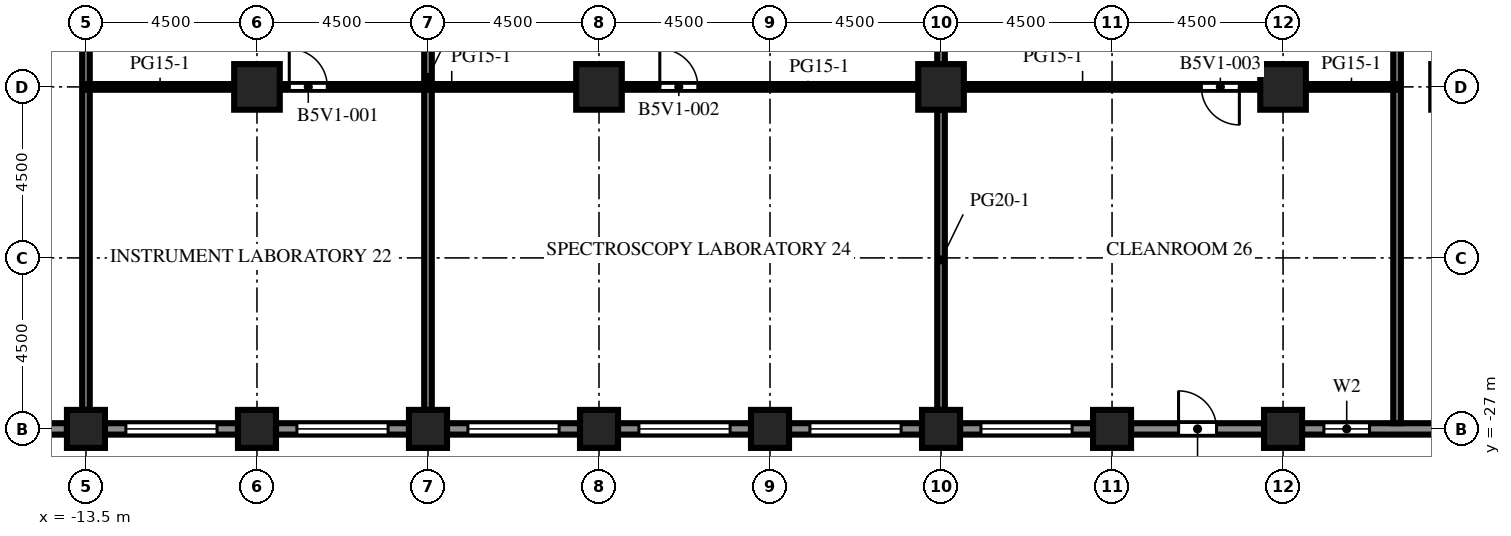
"""IFC4 building model, lengths in metres.
Left out: names, types, materials, properties, quantities, classifications, styles, units other than length and angle.
Written with IfcOpenShell. Run it as: python <this file> out.ifc"""

import sys

from ifc_helpers import new_model, si_unit, direction, frame, frame_2d, origin, origin_2d, place, context, subcontext, project, spatial, rectangle, extrude, element, fill, save


model = new_model("IFC4")
c1 = context("Model", 3, precision=1e-05, world=origin(), true_north=direction((0.0, 1.0)))
c2 = subcontext(c1, "Body", "Model", "MODEL_VIEW")
j1 = project(units=[si_unit("LENGTHUNIT", "METRE"), si_unit("PLANEANGLEUNIT", "RADIAN")], contexts=[c1])
p1 = place(None, origin())
s1 = spatial("IfcSite", under=j1, at=p1, CompositionType="ELEMENT")
p2 = place(p1, origin())
s2 = spatial("IfcBuilding", under=s1, at=p2, CompositionType="ELEMENT")
p3 = place(p2, frame((0.0, 0.0, 165.0)))
s3 = spatial("IfcBuildingStorey", under=s2, at=p3, CompositionType="ELEMENT", Elevation=165.0)
for number, where, z_axis, x_axis in (
    (1, (-13.5, -27.0, 0.0), (0.0, 0.0, 1.0), (1.0, 0.0, 0.0)),
    (2, (-9.0, -27.0, 0.0), (0.0, 0.0, 1.0), (1.0, 0.0, 0.0)),
    (3, (-4.5, -27.0, 0.0), (0.0, 0.0, 1.0), (1.0, 0.0, 0.0)),
    (4, (0.0, -27.0, 0.0), (0.0, 0.0, 1.0), (1.0, 0.0, 0.0)),
    (5, (4.5, -27.0, 0.0), (0.0, 0.0, 1.0), (1.0, 0.0, 0.0)),
    (6, (9.0, -27.0, 0.0), (0.0, 0.0, 1.0), (1.0, 0.0, 0.0)),
    (7, (13.5, -27.0, 0.0), (0.0, 0.0, 1.0), (1.0, 0.0, 0.0)),
    (8, (18.0, -27.0, 0.0), (0.0, 0.0, 1.0), (1.0, 0.0, 0.0)),
):
    element("IfcColumn", number, at=place(p3, frame(where, z_axis=z_axis, x_axis=x_axis)), inside=s3, PredefinedType="COLUMN", context=c2, shape_type="SweptSolid", body=[
        extrude(rectangle(XDim=1.0, YDim=1.0, at=origin_2d()), origin(), (0.0, 0.0, 1.0), 4.1),
    ])
for number, where, z_axis, x_axis in (
    (9, (-9.0, -18.0, 0.0), (0.0, 0.0, 1.0), (1.0, 0.0, 0.0)),
    (10, (0.0, -18.0, 0.0), (0.0, 0.0, 1.0), (1.0, 0.0, 0.0)),
    (11, (9.0, -18.0, 0.0), (0.0, 0.0, 1.0), (1.0, 0.0, 0.0)),
    (12, (18.0, -18.0, 0.0), (0.0, 0.0, 1.0), (1.0, 0.0, 0.0)),
):
    element("IfcColumn", number, at=place(p3, frame(where, z_axis=z_axis, x_axis=x_axis)), inside=s3, PredefinedType="COLUMN", context=c2, shape_type="SweptSolid", body=[
        extrude(rectangle(XDim=1.2, YDim=1.2, at=origin_2d()), origin(), (0.0, 0.0, 1.0), 4.1),
    ])
p4 = place(p3, frame((-14.0, -27.0, 0.0), z_axis=(0.0, 0.0, 1.0), x_axis=(-1.0, 0.0, 0.0)))
e13 = element("IfcWall", 13, at=p4, inside=s3, PredefinedType="SOLIDWALL", context=c2, shape_type="SweptSolid", body=[
    extrude(rectangle(XDim=3.5, YDim=0.3, at=frame_2d((1.75, 0.0))), origin(), (0.0, 0.0, 1.0), 2.85),
])
p5 = place(p4, frame((1.25, 0.0, 0.0)))
e14 = element("IfcOpeningElement", 14, at=p5, cuts=e13, PredefinedType="OPENING", context=c2, shape_type="SweptSolid", body=[
    extrude(rectangle(XDim=1.0, YDim=2.2, at=frame_2d((0.5, 1.1))), frame((0.0, 0.16, 0.0), z_axis=(0.0, -1.0, 0.0), x_axis=(1.0, 0.0, 0.0)), (0.0, 0.0, 1.0), 0.32),
])
p6 = place(p3, frame((-9.5, -27.0, 0.0), z_axis=(0.0, 0.0, 1.0), x_axis=(-1.0, 0.0, 0.0)))
e15 = element("IfcWall", 15, at=p6, inside=s3, PredefinedType="SOLIDWALL", context=c2, shape_type="SweptSolid", body=[
    extrude(rectangle(XDim=3.5, YDim=0.3, at=frame_2d((1.75, 0.0))), origin(), (0.0, 0.0, 1.0), 2.85),
])
p7 = place(p6, frame((0.55, 0.0, 0.8)))
e16 = element("IfcOpeningElement", 16, at=p7, cuts=e15, PredefinedType="OPENING", context=c2, shape_type="SweptSolid", body=[
    extrude(rectangle(XDim=2.4, YDim=1.7, at=frame_2d((1.2, 0.85))), frame((0.0, 0.16, 0.0), z_axis=(0.0, -1.0, 0.0), x_axis=(1.0, 0.0, 0.0)), (0.0, 0.0, 1.0), 0.32),
])
p8 = place(p3, frame((-5.0, -27.0, 0.0), z_axis=(0.0, 0.0, 1.0), x_axis=(-1.0, 0.0, 0.0)))
e17 = element("IfcWall", 17, at=p8, inside=s3, PredefinedType="SOLIDWALL", context=c2, shape_type="SweptSolid", body=[
    extrude(rectangle(XDim=3.5, YDim=0.3, at=frame_2d((1.75, 0.0))), origin(), (0.0, 0.0, 1.0), 2.85),
])
p9 = place(p8, frame((0.55, 0.0, 0.8)))
e18 = element("IfcOpeningElement", 18, at=p9, cuts=e17, PredefinedType="OPENING", context=c2, shape_type="SweptSolid", body=[
    extrude(rectangle(XDim=2.4, YDim=1.7, at=frame_2d((1.2, 0.85))), frame((0.0, 0.16, 0.0), z_axis=(0.0, -1.0, 0.0), x_axis=(1.0, 0.0, 0.0)), (0.0, 0.0, 1.0), 0.32),
])
p10 = place(p3, frame((-0.5, -27.0, 0.0), z_axis=(0.0, 0.0, 1.0), x_axis=(-1.0, 0.0, 0.0)))
e19 = element("IfcWall", 19, at=p10, inside=s3, PredefinedType="SOLIDWALL", context=c2, shape_type="SweptSolid", body=[
    extrude(rectangle(XDim=3.5, YDim=0.3, at=frame_2d((1.75, 0.0))), origin(), (0.0, 0.0, 1.0), 2.85),
])
p11 = place(p10, frame((0.55, 0.0, 0.8)))
e20 = element("IfcOpeningElement", 20, at=p11, cuts=e19, PredefinedType="OPENING", context=c2, shape_type="SweptSolid", body=[
    extrude(rectangle(XDim=2.4, YDim=1.7, at=frame_2d((1.2, 0.85))), frame((0.0, 0.16, 0.0), z_axis=(0.0, -1.0, 0.0), x_axis=(1.0, 0.0, 0.0)), (0.0, 0.0, 1.0), 0.32),
])
p12 = place(p3, frame((4.0, -27.0, 0.0), z_axis=(0.0, 0.0, 1.0), x_axis=(-1.0, 0.0, 0.0)))
e21 = element("IfcWall", 21, at=p12, inside=s3, PredefinedType="SOLIDWALL", context=c2, shape_type="SweptSolid", body=[
    extrude(rectangle(XDim=3.5, YDim=0.3, at=frame_2d((1.75, 0.0))), origin(), (0.0, 0.0, 1.0), 2.85),
])
p13 = place(p12, frame((0.55, 0.0, 0.8)))
e22 = element("IfcOpeningElement", 22, at=p13, cuts=e21, PredefinedType="OPENING", context=c2, shape_type="SweptSolid", body=[
    extrude(rectangle(XDim=2.4, YDim=1.7, at=frame_2d((1.2, 0.85))), frame((0.0, 0.16, 0.0), z_axis=(0.0, -1.0, 0.0), x_axis=(1.0, 0.0, 0.0)), (0.0, 0.0, 1.0), 0.32),
])
p14 = place(p3, frame((8.5, -27.0, 0.0), z_axis=(0.0, 0.0, 1.0), x_axis=(-1.0, 0.0, 0.0)))
e23 = element("IfcWall", 23, at=p14, inside=s3, PredefinedType="SOLIDWALL", context=c2, shape_type="SweptSolid", body=[
    extrude(rectangle(XDim=3.5, YDim=0.3, at=frame_2d((1.75, 0.0))), origin(), (0.0, 0.0, 1.0), 2.85),
])
p15 = place(p14, frame((0.55, 0.0, 0.8)))
e24 = element("IfcOpeningElement", 24, at=p15, cuts=e23, PredefinedType="OPENING", context=c2, shape_type="SweptSolid", body=[
    extrude(rectangle(XDim=2.4, YDim=1.7, at=frame_2d((1.2, 0.85))), frame((0.0, 0.16, 0.0), z_axis=(0.0, -1.0, 0.0), x_axis=(1.0, 0.0, 0.0)), (0.0, 0.0, 1.0), 0.32),
])
p16 = place(p3, frame((13.0, -27.0, 0.0), z_axis=(0.0, 0.0, 1.0), x_axis=(-1.0, 0.0, 0.0)))
e25 = element("IfcWall", 25, at=p16, inside=s3, PredefinedType="SOLIDWALL", context=c2, shape_type="SweptSolid", body=[
    extrude(rectangle(XDim=3.5, YDim=0.3, at=frame_2d((1.75, 0.0))), origin(), (0.0, 0.0, 1.0), 2.85),
])
p17 = place(p16, frame((0.55, 0.0, 0.8)))
e26 = element("IfcOpeningElement", 26, at=p17, cuts=e25, PredefinedType="OPENING", context=c2, shape_type="SweptSolid", body=[
    extrude(rectangle(XDim=2.4, YDim=1.7, at=frame_2d((1.2, 0.85))), frame((0.0, 0.16, 0.0), z_axis=(0.0, -1.0, 0.0), x_axis=(1.0, 0.0, 0.0)), (0.0, 0.0, 1.0), 0.32),
])
p18 = place(p3, frame((17.5, -27.0, 0.0), z_axis=(0.0, 0.0, 1.0), x_axis=(-1.0, 0.0, 0.0)))
e27 = element("IfcWall", 27, at=p18, inside=s3, PredefinedType="SOLIDWALL", context=c2, shape_type="SweptSolid", body=[
    extrude(rectangle(XDim=3.5, YDim=0.3, at=frame_2d((1.75, 0.0))), origin(), (0.0, 0.0, 1.0), 2.85),
])
p19 = place(p18, frame((1.25, 0.0, 0.0)))
e28 = element("IfcOpeningElement", 28, at=p19, cuts=e27, PredefinedType="OPENING", context=c2, shape_type="SweptSolid", body=[
    extrude(rectangle(XDim=1.0, YDim=2.2, at=frame_2d((0.5, 1.1))), frame((0.0, 0.16, 0.0), z_axis=(0.0, -1.0, 0.0), x_axis=(1.0, 0.0, 0.0)), (0.0, 0.0, 1.0), 0.32),
])
p20 = place(p3, frame((22.0, -27.0, 0.0), z_axis=(0.0, 0.0, 1.0), x_axis=(-1.0, 0.0, 0.0)))
e29 = element("IfcWall", 29, at=p20, inside=s3, PredefinedType="SOLIDWALL", context=c2, shape_type="SweptSolid", body=[
    extrude(rectangle(XDim=3.5, YDim=0.3, at=frame_2d((1.75, 0.0))), origin(), (0.0, 0.0, 1.0), 2.85),
])
p21 = place(p20, frame((1.725, 0.0, 0.8)))
e30 = element("IfcOpeningElement", 30, at=p21, cuts=e29, PredefinedType="OPENING", context=c2, shape_type="SweptSolid", body=[
    extrude(rectangle(XDim=1.2, YDim=1.7, at=frame_2d((0.6, 0.85))), frame((0.0, 0.16, 0.0), z_axis=(0.0, -1.0, 0.0), x_axis=(1.0, 0.0, 0.0)), (0.0, 0.0, 1.0), 0.32),
])
p22 = place(p3, frame((-13.5, -26.5, 0.0), z_axis=(0.0, 0.0, 1.0), x_axis=(0.0, 1.0, 0.0)))
e31 = element("IfcWall", 31, at=p22, inside=s3, PredefinedType="PARTITIONING", context=c2, shape_type="SweptSolid", body=[
    extrude(rectangle(XDim=29.75, YDim=0.2, at=frame_2d((14.875, 0.0))), origin(), (0.0, 0.0, 1.0), 3.65),
])
p23 = place(p22, frame((23.85, 0.0, 0.0)))
e32 = element("IfcOpeningElement", 32, at=p23, cuts=e31, PredefinedType="OPENING", context=c2, shape_type="SweptSolid", body=[
    extrude(rectangle(XDim=1.0, YDim=2.1, at=frame_2d((0.5, 1.05))), frame((0.0, 0.11, 0.0), z_axis=(0.0, -1.0, 0.0), x_axis=(1.0, 0.0, 0.0)), (0.0, 0.0, 1.0), 0.22),
])
p24 = place(p3, frame((-4.5, -26.5, 0.0), z_axis=(0.0, 0.0, 1.0), x_axis=(0.0, 1.0, 0.0)))
e33 = element("IfcWall", 33, at=p24, inside=s3, PredefinedType="PARTITIONING", context=c2, shape_type="SweptSolid", body=[
    extrude(rectangle(XDim=17.5, YDim=0.2, at=frame_2d((8.75, 0.0))), origin(), (0.0, 0.0, 1.0), 3.65),
])
p25 = place(p3, frame((9.0, -26.5, 0.0), z_axis=(0.0, 0.0, 1.0), x_axis=(0.0, 1.0, 0.0)))
e34 = element("IfcWall", 34, at=p25, inside=s3, PredefinedType="PARTITIONING", context=c2, shape_type="SweptSolid", body=[
    extrude(rectangle(XDim=7.9, YDim=0.2, at=frame_2d((3.95, 0.0))), origin(), (0.0, 0.0, 1.0), 3.65),
])
p26 = place(p3, frame((9.0, -17.4, 0.0), z_axis=(0.0, 0.0, 1.0), x_axis=(0.0, 1.0, 0.0)))
e35 = element("IfcWall", 35, at=p26, inside=s3, PredefinedType="PARTITIONING", context=c2, shape_type="SweptSolid", body=[
    extrude(rectangle(XDim=8.4, YDim=0.2, at=frame_2d((4.2, 0.0))), origin(), (0.0, 0.0, 1.0), 3.65),
])
p27 = place(p3, frame((21.0, 3.25, 0.0), z_axis=(0.0, 0.0, 1.0), x_axis=(0.0, -1.0, 0.0)))
e36 = element("IfcWall", 36, at=p27, inside=s3, PredefinedType="PARTITIONING", context=c2, shape_type="SweptSolid", body=[
    extrude(rectangle(XDim=30.1, YDim=0.2, at=frame_2d((15.05, 0.0))), origin(), (0.0, 0.0, 1.0), 3.65),
])
p28 = place(p27, frame((5.15, 0.0, 0.0)))
e37 = element("IfcOpeningElement", 37, at=p28, cuts=e36, PredefinedType="OPENING", context=c2, shape_type="SweptSolid", body=[
    extrude(rectangle(XDim=1.0, YDim=2.1, at=frame_2d((0.5, 1.05))), frame((0.0, 0.11, 0.0), z_axis=(0.0, -1.0, 0.0), x_axis=(1.0, 0.0, 0.0)), (0.0, 0.0, 1.0), 0.22),
])
p29 = place(p3, frame((-13.5, -18.0, 0.0), z_axis=(0.0, 0.0, 1.0), x_axis=(1.0, 0.0, 0.0)))
e38 = element("IfcWall", 38, at=p29, inside=s3, PredefinedType="PARTITIONING", context=c2, shape_type="SweptSolid", body=[
    extrude(rectangle(XDim=3.9, YDim=0.15, at=frame_2d((1.95, 0.0))), origin(), (0.0, 0.0, 1.0), 3.65),
])
p30 = place(p3, frame((-0.6, -18.0, 0.0), z_axis=(0.0, 0.0, 1.0), x_axis=(-1.0, 0.0, 0.0)))
e39 = element("IfcWall", 39, at=p30, inside=s3, PredefinedType="PARTITIONING", context=c2, shape_type="SweptSolid", body=[
    extrude(rectangle(XDim=7.8, YDim=0.15, at=frame_2d((3.9, 0.0))), origin(), (0.0, 0.0, 1.0), 3.65),
])
p31 = place(p30, frame((6.55, 0.0, 0.0)))
e40 = element("IfcOpeningElement", 40, at=p31, cuts=e39, PredefinedType="OPENING", context=c2, shape_type="SweptSolid", body=[
    extrude(rectangle(XDim=1.0, YDim=2.1, at=frame_2d((0.5, 1.05))), frame((0.0, 0.085, 0.0), z_axis=(0.0, -1.0, 0.0), x_axis=(1.0, 0.0, 0.0)), (0.0, 0.0, 1.0), 0.17),
])
p32 = place(p3, frame((8.4, -18.0, 0.0), z_axis=(0.0, 0.0, 1.0), x_axis=(-1.0, 0.0, 0.0)))
e41 = element("IfcWall", 41, at=p32, inside=s3, PredefinedType="PARTITIONING", context=c2, shape_type="SweptSolid", body=[
    extrude(rectangle(XDim=7.8, YDim=0.15, at=frame_2d((3.9, 0.0))), origin(), (0.0, 0.0, 1.0), 3.65),
])
p33 = place(p32, frame((5.8, 0.0, 0.0)))
e42 = element("IfcOpeningElement", 42, at=p33, cuts=e41, PredefinedType="OPENING", context=c2, shape_type="SweptSolid", body=[
    extrude(rectangle(XDim=1.0, YDim=2.1, at=frame_2d((0.5, 1.05))), frame((0.0, 0.085, 0.0), z_axis=(0.0, -1.0, 0.0), x_axis=(1.0, 0.0, 0.0)), (0.0, 0.0, 1.0), 0.17),
])
p34 = place(p3, frame((17.4, -18.0, 0.0), z_axis=(0.0, 0.0, 1.0), x_axis=(-1.0, 0.0, 0.0)))
e43 = element("IfcWall", 43, at=p34, inside=s3, PredefinedType="PARTITIONING", context=c2, shape_type="SweptSolid", body=[
    extrude(rectangle(XDim=7.8, YDim=0.15, at=frame_2d((3.9, 0.0))), origin(), (0.0, 0.0, 1.0), 3.65),
])
p35 = place(p34, frame((0.55, 0.0, 0.0)))
e44 = element("IfcOpeningElement", 44, at=p35, cuts=e43, PredefinedType="OPENING", context=c2, shape_type="SweptSolid", body=[
    extrude(rectangle(XDim=1.0, YDim=2.1, at=frame_2d((0.5, 1.05))), frame((0.0, 0.085, 0.0), z_axis=(0.0, -1.0, 0.0), x_axis=(1.0, 0.0, 0.0)), (0.0, 0.0, 1.0), 0.17),
])
p36 = place(p3, frame((18.6, -18.0, 0.0), z_axis=(0.0, 0.0, 1.0), x_axis=(1.0, 0.0, 0.0)))
e45 = element("IfcWall", 45, at=p36, inside=s3, PredefinedType="PARTITIONING", context=c2, shape_type="SweptSolid", body=[
    extrude(rectangle(XDim=2.4, YDim=0.15, at=frame_2d((1.2, 0.0))), origin(), (0.0, 0.0, 1.0), 3.65),
])
p37 = place(p7, origin())
e46 = element("IfcWindow", 46, at=p37, inside=s3, PartitioningType="SINGLE_PANEL", PredefinedType="WINDOW", context=c2, shape_type="SweptSolid", body=[
    extrude(rectangle(XDim=2.4, YDim=1.7, at=frame_2d((1.2, 0.85))), frame((0.0, 0.03, 0.0), z_axis=(0.0, -1.0, 0.0), x_axis=(1.0, 0.0, 0.0)), (0.0, 0.0, 1.0), 0.06),
])
fill(e16, e46)
p38 = place(p9, origin())
e47 = element("IfcWindow", 47, at=p38, inside=s3, PartitioningType="SINGLE_PANEL", PredefinedType="WINDOW", context=c2, shape_type="SweptSolid", body=[
    extrude(rectangle(XDim=2.4, YDim=1.7, at=frame_2d((1.2, 0.85))), frame((0.0, 0.03, 0.0), z_axis=(0.0, -1.0, 0.0), x_axis=(1.0, 0.0, 0.0)), (0.0, 0.0, 1.0), 0.06),
])
fill(e18, e47)
p39 = place(p11, origin())
e48 = element("IfcWindow", 48, at=p39, inside=s3, PartitioningType="SINGLE_PANEL", PredefinedType="WINDOW", context=c2, shape_type="SweptSolid", body=[
    extrude(rectangle(XDim=2.4, YDim=1.7, at=frame_2d((1.2, 0.85))), frame((0.0, 0.03, 0.0), z_axis=(0.0, -1.0, 0.0), x_axis=(1.0, 0.0, 0.0)), (0.0, 0.0, 1.0), 0.06),
])
fill(e20, e48)
p40 = place(p13, origin())
e49 = element("IfcWindow", 49, at=p40, inside=s3, PartitioningType="SINGLE_PANEL", PredefinedType="WINDOW", context=c2, shape_type="SweptSolid", body=[
    extrude(rectangle(XDim=2.4, YDim=1.7, at=frame_2d((1.2, 0.85))), frame((0.0, 0.03, 0.0), z_axis=(0.0, -1.0, 0.0), x_axis=(1.0, 0.0, 0.0)), (0.0, 0.0, 1.0), 0.06),
])
fill(e22, e49)
p41 = place(p15, origin())
e50 = element("IfcWindow", 50, at=p41, inside=s3, PartitioningType="SINGLE_PANEL", PredefinedType="WINDOW", context=c2, shape_type="SweptSolid", body=[
    extrude(rectangle(XDim=2.4, YDim=1.7, at=frame_2d((1.2, 0.85))), frame((0.0, 0.03, 0.0), z_axis=(0.0, -1.0, 0.0), x_axis=(1.0, 0.0, 0.0)), (0.0, 0.0, 1.0), 0.06),
])
fill(e24, e50)
p42 = place(p17, origin())
e51 = element("IfcWindow", 51, at=p42, inside=s3, PartitioningType="SINGLE_PANEL", PredefinedType="WINDOW", context=c2, shape_type="SweptSolid", body=[
    extrude(rectangle(XDim=2.4, YDim=1.7, at=frame_2d((1.2, 0.85))), frame((0.0, 0.03, 0.0), z_axis=(0.0, -1.0, 0.0), x_axis=(1.0, 0.0, 0.0)), (0.0, 0.0, 1.0), 0.06),
])
fill(e26, e51)
p43 = place(p19, origin())
e52 = element("IfcDoor", 52, at=p43, inside=s3, OperationType="SINGLE_SWING_RIGHT", PredefinedType="DOOR", context=c2, shape_type="SweptSolid", body=[
    extrude(rectangle(XDim=1.0, YDim=2.2, at=frame_2d((0.5, 1.1))), frame((0.0, 0.025, 0.0), z_axis=(0.0, -1.0, 0.0), x_axis=(1.0, 0.0, 0.0)), (0.0, 0.0, 1.0), 0.05),
])
fill(e28, e52)
p44 = place(p21, origin())
e53 = element("IfcWindow", 53, at=p44, inside=s3, PartitioningType="SINGLE_PANEL", PredefinedType="WINDOW", context=c2, shape_type="SweptSolid", body=[
    extrude(rectangle(XDim=1.2, YDim=1.7, at=frame_2d((0.6, 0.85))), frame((0.0, 0.03, 0.0), z_axis=(0.0, -1.0, 0.0), x_axis=(1.0, 0.0, 0.0)), (0.0, 0.0, 1.0), 0.06),
])
fill(e30, e53)
p45 = place(p31, origin())
e54 = element("IfcDoor", 54, at=p45, inside=s3, OperationType="SINGLE_SWING_RIGHT", PredefinedType="DOOR", context=c2, shape_type="SweptSolid", body=[
    extrude(rectangle(XDim=1.0, YDim=2.1, at=frame_2d((0.5, 1.05))), frame((0.0, 0.025, 0.0), z_axis=(0.0, -1.0, 0.0), x_axis=(1.0, 0.0, 0.0)), (0.0, 0.0, 1.0), 0.05),
])
fill(e40, e54)
p46 = place(p33, origin())
e55 = element("IfcDoor", 55, at=p46, inside=s3, OperationType="SINGLE_SWING_RIGHT", PredefinedType="DOOR", context=c2, shape_type="SweptSolid", body=[
    extrude(rectangle(XDim=1.0, YDim=2.1, at=frame_2d((0.5, 1.05))), frame((0.0, 0.025, 0.0), z_axis=(0.0, -1.0, 0.0), x_axis=(1.0, 0.0, 0.0)), (0.0, 0.0, 1.0), 0.05),
])
fill(e42, e55)
p47 = place(p35, origin())
e56 = element("IfcDoor", 56, at=p47, inside=s3, OperationType="SINGLE_SWING_LEFT", PredefinedType="DOOR", context=c2, shape_type="SweptSolid", body=[
    extrude(rectangle(XDim=1.0, YDim=2.1, at=frame_2d((0.5, 1.05))), frame((0.0, 0.025, 0.0), z_axis=(0.0, -1.0, 0.0), x_axis=(1.0, 0.0, 0.0)), (0.0, 0.0, 1.0), 0.05),
])
fill(e44, e56)
save(model, sys.argv[1])
